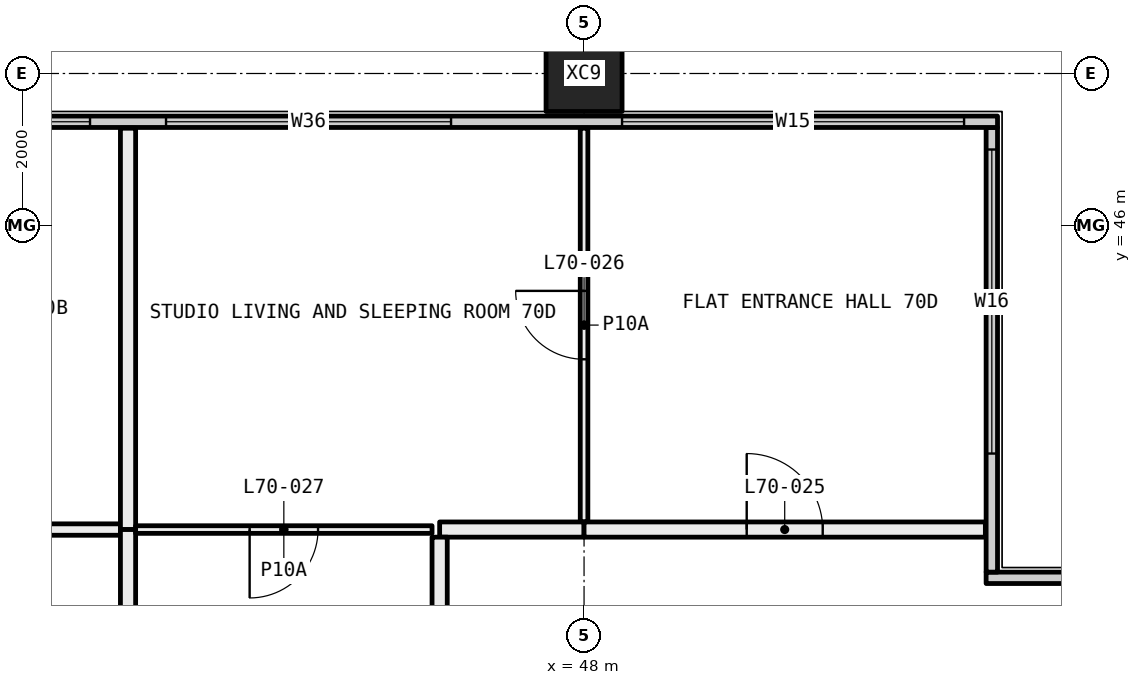
"""IFC4 building model, lengths in metres.
Left out: names, types, materials, properties, quantities, classifications, styles, units other than length and angle.
Written with IfcOpenShell. Run it as: python <this file> out.ifc"""

import sys

from ifc_helpers import new_model, si_unit, direction, frame, frame_2d, origin, origin_2d, place, context, subcontext, project, spatial, rectangle, hollow_rectangle, extrude, element, fill, save


model = new_model("IFC4")
c1 = context("Model", 3, precision=1e-05, world=origin(), true_north=direction((0.0, 1.0)))
c2 = subcontext(c1, "Body", "Model", "MODEL_VIEW")
j1 = project(units=[si_unit("LENGTHUNIT", "METRE"), si_unit("PLANEANGLEUNIT", "RADIAN")], contexts=[c1])
p1 = place(None, origin())
s1 = spatial("IfcSite", under=j1, at=p1, CompositionType="ELEMENT")
p2 = place(p1, origin())
s2 = spatial("IfcBuilding", under=s1, at=p2, CompositionType="ELEMENT")
p3 = place(p2, frame((0.0, 0.0, 259.35)))
s3 = spatial("IfcBuildingStorey", under=s2, at=p3, CompositionType="ELEMENT", Elevation=259.35)
p4 = place(p3, frame((48.0, 48.0, -0.4), z_axis=(0.0, 0.0, 1.0), x_axis=(1.0, 0.0, 0.0)))
e1 = element("IfcColumn", 1, at=p4, inside=s3, PredefinedType="COLUMN", context=c2, shape_type="SweptSolid", body=[
    extrude(hollow_rectangle(XDim=1.0, YDim=1.0, WallThickness=0.036, at=origin_2d()), origin(), (0.0, 0.0, 1.0), 3.45),
])
p5 = place(p3, frame((53.29, 41.365, 0.0), z_axis=(0.0, 0.0, 1.0), x_axis=(1.0, 0.0, 0.0)))
e2 = element("IfcWall", 2, at=p5, inside=s3, PredefinedType="ELEMENTEDWALL", context=c2, shape_type="SweptSolid", body=[
    extrude(rectangle(XDim=6.15, YDim=0.15, at=frame_2d((3.075, 0.0))), origin(), (0.0, 0.0, 1.0), 3.05),
])
p6 = place(p5, frame((1.71, 0.0, 0.45)))
e3 = element("IfcOpeningElement", 3, at=p6, cuts=e2, PredefinedType="OPENING", context=c2, shape_type="SweptSolid", body=[
    extrude(rectangle(XDim=4.0, YDim=2.55, at=frame_2d((2.0, 1.275))), frame((0.0, 0.085, 0.0), z_axis=(0.0, -1.0, 0.0), x_axis=(1.0, 0.0, 0.0)), (0.0, 0.0, 1.0), 0.17),
])
p7 = place(p3, frame((53.365, 41.44, 0.0), z_axis=(0.0, 0.0, 1.0), x_axis=(0.0, 1.0, 0.0)))
e4 = element("IfcWall", 4, at=p7, inside=s3, PredefinedType="ELEMENTEDWALL", context=c2, shape_type="SweptSolid", body=[
    extrude(rectangle(XDim=5.85, YDim=0.15, at=frame_2d((2.925, 0.0))), origin(), (0.0, 0.0, 1.0), 3.05),
])
p8 = place(p7, frame((1.56, 0.0, 0.45)))
e5 = element("IfcOpeningElement", 5, at=p8, cuts=e4, PredefinedType="OPENING", context=c2, shape_type="SweptSolid", body=[
    extrude(rectangle(XDim=4.0, YDim=2.55, at=frame_2d((2.0, 1.275))), frame((0.0, 0.085, 0.0), z_axis=(0.0, -1.0, 0.0), x_axis=(1.0, 0.0, 0.0)), (0.0, 0.0, 1.0), 0.17),
])
p9 = place(p3, frame((18.56, 47.365, 0.0), z_axis=(0.0, 0.0, 1.0), x_axis=(1.0, 0.0, 0.0)))
e6 = element("IfcWall", 6, at=p9, inside=s3, PredefinedType="ELEMENTEDWALL", context=c2, shape_type="SweptSolid", body=[
    extrude(rectangle(XDim=34.88, YDim=0.15, at=frame_2d((17.44, 0.0))), origin(), (0.0, 0.0, 1.0), 3.05),
])
p10 = place(p9, frame((0.44, 0.0, 0.45)))
e7 = element("IfcOpeningElement", 7, at=p10, cuts=e6, PredefinedType="OPENING", context=c2, shape_type="SweptSolid", body=[
    extrude(rectangle(XDim=4.5, YDim=2.55, at=frame_2d((2.25, 1.275))), frame((0.0, 0.085, 0.0), z_axis=(0.0, -1.0, 0.0), x_axis=(1.0, 0.0, 0.0)), (0.0, 0.0, 1.0), 0.17),
])
p11 = place(p9, frame((7.19, 0.0, 0.45)))
e8 = element("IfcOpeningElement", 8, at=p11, cuts=e6, PredefinedType="OPENING", context=c2, shape_type="SweptSolid", body=[
    extrude(rectangle(XDim=3.75, YDim=2.55, at=frame_2d((1.875, 1.275))), frame((0.0, 0.085, 0.0), z_axis=(0.0, -1.0, 0.0), x_axis=(1.0, 0.0, 0.0)), (0.0, 0.0, 1.0), 0.17),
])
p12 = place(p9, frame((11.94, 0.0, 0.45)))
e9 = element("IfcOpeningElement", 9, at=p12, cuts=e6, PredefinedType="OPENING", context=c2, shape_type="SweptSolid", body=[
    extrude(rectangle(XDim=2.0, YDim=2.55, at=frame_2d((1.0, 1.275))), frame((0.0, 0.085, 0.0), z_axis=(0.0, -1.0, 0.0), x_axis=(1.0, 0.0, 0.0)), (0.0, 0.0, 1.0), 0.17),
])
p13 = place(p9, frame((14.94, 0.0, 0.45)))
e10 = element("IfcOpeningElement", 10, at=p13, cuts=e6, PredefinedType="OPENING", context=c2, shape_type="SweptSolid", body=[
    extrude(rectangle(XDim=0.75, YDim=2.55, at=frame_2d((0.375, 1.275))), frame((0.0, 0.085, 0.0), z_axis=(0.0, -1.0, 0.0), x_axis=(1.0, 0.0, 0.0)), (0.0, 0.0, 1.0), 0.17),
])
p14 = place(p9, frame((19.19, 0.0, 0.45)))
e11 = element("IfcOpeningElement", 11, at=p14, cuts=e6, PredefinedType="OPENING", context=c2, shape_type="SweptSolid", body=[
    extrude(rectangle(XDim=3.75, YDim=2.55, at=frame_2d((1.875, 1.275))), frame((0.0, 0.085, 0.0), z_axis=(0.0, -1.0, 0.0), x_axis=(1.0, 0.0, 0.0)), (0.0, 0.0, 1.0), 0.17),
])
p15 = place(p9, frame((23.94, 0.0, 0.45)))
e12 = element("IfcOpeningElement", 12, at=p15, cuts=e6, PredefinedType="OPENING", context=c2, shape_type="SweptSolid", body=[
    extrude(rectangle(XDim=3.75, YDim=2.55, at=frame_2d((1.875, 1.275))), frame((0.0, 0.085, 0.0), z_axis=(0.0, -1.0, 0.0), x_axis=(1.0, 0.0, 0.0)), (0.0, 0.0, 1.0), 0.17),
])
p16 = place(p9, frame((29.94, 0.0, 0.45)))
e13 = element("IfcOpeningElement", 13, at=p16, cuts=e6, PredefinedType="OPENING", context=c2, shape_type="SweptSolid", body=[
    extrude(rectangle(XDim=4.5, YDim=2.55, at=frame_2d((2.25, 1.275))), frame((0.0, 0.085, 0.0), z_axis=(0.0, -1.0, 0.0), x_axis=(1.0, 0.0, 0.0)), (0.0, 0.0, 1.0), 0.17),
])
p17 = place(p3, frame((36.0, 42.0, 0.0), z_axis=(0.0, 0.0, 1.0), x_axis=(1.0, 0.0, 0.0)))
e14 = element("IfcWall", 14, at=p17, inside=s3, PredefinedType="PARTITIONING", context=c2, shape_type="SweptSolid", body=[
    extrude(rectangle(XDim=5.9, YDim=0.15, at=frame_2d((2.95, 0.0))), origin(), (0.0, 0.0, 1.0), 2.45),
])
p18 = place(p17, frame((2.5, 0.0, 0.0)))
e15 = element("IfcOpeningElement", 15, at=p18, cuts=e14, PredefinedType="OPENING", context=c2, shape_type="SweptSolid", body=[
    extrude(rectangle(XDim=0.9, YDim=2.1, at=frame_2d((0.45, 1.05))), frame((0.0, 0.085, 0.0), z_axis=(0.0, -1.0, 0.0), x_axis=(1.0, 0.0, 0.0)), (0.0, 0.0, 1.0), 0.17),
])
p19 = place(p3, frame((42.0, 42.0, 0.0), z_axis=(0.0, 0.0, 1.0), x_axis=(0.0, 1.0, 0.0)))
e16 = element("IfcWall", 16, at=p19, inside=s3, PredefinedType="PARTITIONING", context=c2, shape_type="SweptSolid", body=[
    extrude(rectangle(XDim=5.28, YDim=0.2, at=frame_2d((2.64, 0.0))), origin(), (0.0, 0.0, 1.0), 3.05),
])
p20 = place(p3, frame((42.0, 38.1, 0.0), z_axis=(0.0, 0.0, 1.0), x_axis=(0.0, 1.0, 0.0)))
e17 = element("IfcWall", 17, at=p20, inside=s3, PredefinedType="PARTITIONING", context=c2, shape_type="SweptSolid", body=[
    extrude(rectangle(XDim=3.9, YDim=0.2, at=frame_2d((1.95, 0.0))), origin(), (0.0, 0.0, 1.0), 3.05),
])
p21 = place(p3, frame((48.0, 42.1, 0.0), z_axis=(0.0, 0.0, 1.0), x_axis=(0.0, 1.0, 0.0)))
e18 = element("IfcWall", 18, at=p21, inside=s3, PredefinedType="PARTITIONING", context=c2, shape_type="SweptSolid", body=[
    extrude(rectangle(XDim=5.18, YDim=0.1, at=frame_2d((2.59, 0.0))), origin(), (0.0, 0.0, 1.0), 3.05),
])
p22 = place(p21, frame((2.14, 0.0, 0.0)))
e19 = element("IfcOpeningElement", 19, at=p22, cuts=e18, PredefinedType="OPENING", context=c2, shape_type="SweptSolid", body=[
    extrude(rectangle(XDim=0.9, YDim=2.1, at=frame_2d((0.45, 1.05))), frame((0.0, 0.06, 0.0), z_axis=(0.0, -1.0, 0.0), x_axis=(1.0, 0.0, 0.0)), (0.0, 0.0, 1.0), 0.12),
])
p23 = place(p3, frame((42.1, 42.0, 0.0), z_axis=(0.0, 0.0, 1.0), x_axis=(1.0, 0.0, 0.0)))
e20 = element("IfcWall", 20, at=p23, inside=s3, PredefinedType="PARTITIONING", context=c2, shape_type="SweptSolid", body=[
    extrude(rectangle(XDim=3.9, YDim=0.1, at=frame_2d((1.95, 0.0))), origin(), (0.0, 0.0, 1.0), 3.05),
])
p24 = place(p23, frame((1.5, 0.0, 0.0)))
e21 = element("IfcOpeningElement", 21, at=p24, cuts=e20, PredefinedType="OPENING", context=c2, shape_type="SweptSolid", body=[
    extrude(rectangle(XDim=0.9, YDim=2.1, at=frame_2d((0.45, 1.05))), frame((0.0, 0.06, 0.0), z_axis=(0.0, -1.0, 0.0), x_axis=(1.0, 0.0, 0.0)), (0.0, 0.0, 1.0), 0.12),
])
p25 = place(p3, frame((46.1, 42.0, 0.0), z_axis=(0.0, 0.0, 1.0), x_axis=(1.0, 0.0, 0.0)))
e22 = element("IfcWall", 22, at=p25, inside=s3, PredefinedType="PARTITIONING", context=c2, shape_type="SweptSolid", body=[
    extrude(rectangle(XDim=1.9, YDim=0.2, at=frame_2d((0.95, 0.0))), origin(), (0.0, 0.0, 1.0), 3.05),
])
p26 = place(p3, frame((48.0, 42.0, 0.0), z_axis=(0.0, 0.0, 1.0), x_axis=(1.0, 0.0, 0.0)))
e23 = element("IfcWall", 23, at=p26, inside=s3, PredefinedType="PARTITIONING", context=c2, shape_type="SweptSolid", body=[
    extrude(rectangle(XDim=5.28, YDim=0.2, at=frame_2d((2.64, 0.0))), origin(), (0.0, 0.0, 1.0), 3.05),
])
p27 = place(p26, frame((2.14, 0.0, 0.0)))
e24 = element("IfcOpeningElement", 24, at=p27, cuts=e23, PredefinedType="OPENING", context=c2, shape_type="SweptSolid", body=[
    extrude(rectangle(XDim=1.0, YDim=2.1, at=frame_2d((0.5, 1.05))), frame((0.0, 0.11, 0.0), z_axis=(0.0, -1.0, 0.0), x_axis=(1.0, 0.0, 0.0)), (0.0, 0.0, 1.0), 0.22),
])
p28 = place(p3, frame((46.1, 36.1, 0.0), z_axis=(0.0, 0.0, 1.0), x_axis=(0.0, 1.0, 0.0)))
e25 = element("IfcWall", 25, at=p28, inside=s3, PredefinedType="PARTITIONING", context=c2, shape_type="SweptSolid", body=[
    extrude(rectangle(XDim=5.8, YDim=0.2, at=frame_2d((2.9, 0.0))), origin(), (0.0, 0.0, 1.0), 3.05),
])
p29 = place(p8, origin())
e26 = element("IfcWindow", 26, at=p29, inside=s3, PartitioningType="SINGLE_PANEL", PredefinedType="WINDOW", context=c2, shape_type="SweptSolid", body=[
    extrude(rectangle(XDim=4.0, YDim=2.55, at=frame_2d((2.0, 1.275))), frame((0.0, 0.03, 0.0), z_axis=(0.0, -1.0, 0.0), x_axis=(1.0, 0.0, 0.0)), (0.0, 0.0, 1.0), 0.06),
])
fill(e5, e26)
p30 = place(p14, origin())
e27 = element("IfcWindow", 27, at=p30, inside=s3, PartitioningType="SINGLE_PANEL", PredefinedType="WINDOW", context=c2, shape_type="SweptSolid", body=[
    extrude(rectangle(XDim=3.75, YDim=2.55, at=frame_2d((1.875, 1.275))), frame((0.0, 0.03, 0.0), z_axis=(0.0, -1.0, 0.0), x_axis=(1.0, 0.0, 0.0)), (0.0, 0.0, 1.0), 0.06),
])
fill(e11, e27)
p31 = place(p15, origin())
e28 = element("IfcWindow", 28, at=p31, inside=s3, PartitioningType="SINGLE_PANEL", PredefinedType="WINDOW", context=c2, shape_type="SweptSolid", body=[
    extrude(rectangle(XDim=3.75, YDim=2.55, at=frame_2d((1.875, 1.275))), frame((0.0, 0.03, 0.0), z_axis=(0.0, -1.0, 0.0), x_axis=(1.0, 0.0, 0.0)), (0.0, 0.0, 1.0), 0.06),
])
fill(e12, e28)
p32 = place(p16, origin())
e29 = element("IfcWindow", 29, at=p32, inside=s3, PartitioningType="SINGLE_PANEL", PredefinedType="WINDOW", context=c2, shape_type="SweptSolid", body=[
    extrude(rectangle(XDim=4.5, YDim=2.55, at=frame_2d((2.25, 1.275))), frame((0.0, 0.03, 0.0), z_axis=(0.0, -1.0, 0.0), x_axis=(1.0, 0.0, 0.0)), (0.0, 0.0, 1.0), 0.06),
])
fill(e13, e29)
p33 = place(p27, origin())
e30 = element("IfcDoor", 30, at=p33, inside=s3, OperationType="SINGLE_SWING_RIGHT", PredefinedType="DOOR", context=c2, shape_type="SweptSolid", body=[
    extrude(rectangle(XDim=1.0, YDim=2.1, at=frame_2d((0.5, 1.05))), frame((0.0, 0.025, 0.0), z_axis=(0.0, -1.0, 0.0), x_axis=(1.0, 0.0, 0.0)), (0.0, 0.0, 1.0), 0.05),
])
fill(e24, e30)
p34 = place(p22, origin())
e31 = element("IfcDoor", 31, at=p34, inside=s3, OperationType="SINGLE_SWING_LEFT", PredefinedType="DOOR", context=c2, shape_type="SweptSolid", body=[
    extrude(rectangle(XDim=0.9, YDim=2.1, at=frame_2d((0.45, 1.05))), frame((0.0, 0.025, 0.0), z_axis=(0.0, -1.0, 0.0), x_axis=(1.0, 0.0, 0.0)), (0.0, 0.0, 1.0), 0.05),
])
fill(e19, e31)
p35 = place(p24, frame((0.9, 0.0, 0.0), x_axis=(-1.0, 0.0, 0.0)))
e32 = element("IfcDoor", 32, at=p35, inside=s3, OperationType="SINGLE_SWING_LEFT", PredefinedType="DOOR", context=c2, shape_type="SweptSolid", body=[
    extrude(rectangle(XDim=0.9, YDim=2.1, at=frame_2d((0.45, 1.05))), frame((0.0, 0.025, 0.0), z_axis=(0.0, -1.0, 0.0), x_axis=(1.0, 0.0, 0.0)), (0.0, 0.0, 1.0), 0.05),
])
fill(e21, e32)
save(model, sys.argv[1])
